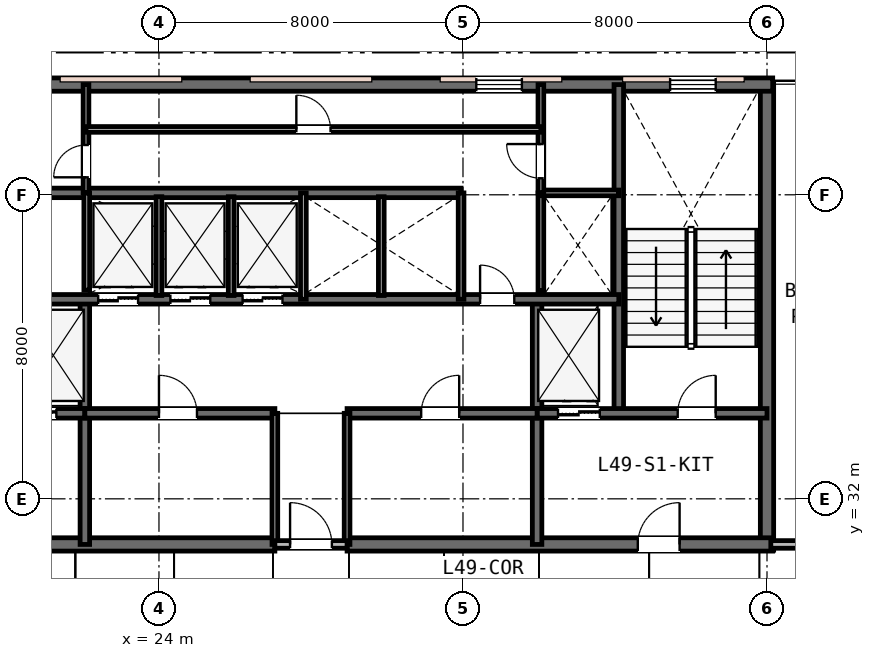
"""IFC4 building model, lengths in metres.
Left out: names, types, materials, properties, quantities, classifications, styles, units other than length and angle.
Written with IfcOpenShell. Run it as: python <this file> out.ifc"""

import sys

from ifc_helpers import new_model, si_unit, direction, frame, frame_2d, origin, place, context, subcontext, project, spatial, rectangle, extrude, element, fill, save


model = new_model("IFC4")
c1 = context("Model", 3, precision=1e-05, world=origin(), true_north=direction((0.0, 1.0)))
c2 = subcontext(c1, "Body", "Model", "MODEL_VIEW")
j1 = project(units=[si_unit("LENGTHUNIT", "METRE"), si_unit("PLANEANGLEUNIT", "RADIAN")], contexts=[c1])
p1 = place(None, origin())
s1 = spatial("IfcSite", under=j1, at=p1, CompositionType="ELEMENT")
p2 = place(p1, origin())
s2 = spatial("IfcBuilding", under=s1, at=p2, CompositionType="ELEMENT")
p3 = place(p2, frame((0.0, 0.0, 190.2)))
s3 = spatial("IfcBuildingStorey", under=s2, at=p3, CompositionType="ELEMENT", Elevation=190.2)
p4 = place(p3, frame((40.0, 30.65, 0.0), z_axis=(0.0, 0.0, 1.0), x_axis=(0.0, 1.0, 0.0)))
e1 = element("IfcWall", 1, at=p4, inside=s3, PredefinedType="SHEAR", context=c2, shape_type="SweptSolid", body=[
    extrude(rectangle(XDim=12.3, YDim=0.35, at=frame_2d((6.15, 0.0))), origin(), (0.0, 0.0, 1.0), 3.6),
])
p5 = place(p3, frame((15.85, 42.9, 0.0), z_axis=(0.0, 0.0, 1.0), x_axis=(1.0, 0.0, 0.0)))
e2 = element("IfcWall", 2, at=p5, inside=s3, PredefinedType="SHEAR", context=c2, shape_type="SweptSolid", body=[
    extrude(rectangle(XDim=24.3, YDim=0.35, at=frame_2d((12.15, 0.0))), origin(), (0.0, 0.0, 1.0), 3.6),
])
p6 = place(p5, frame((1.6, 0.0, 0.95)))
e3 = element("IfcOpeningElement", 3, at=p6, cuts=e2, PredefinedType="OPENING", context=c2, shape_type="SweptSolid", body=[
    extrude(rectangle(XDim=1.2, YDim=1.6, at=frame_2d((0.6, 0.8))), frame((0.0, 0.185, 0.0), z_axis=(0.0, -1.0, 0.0), x_axis=(1.0, 0.0, 0.0)), (0.0, 0.0, 1.0), 0.37),
])
p7 = place(p5, frame((16.5, 0.0, 0.95)))
e4 = element("IfcOpeningElement", 4, at=p7, cuts=e2, PredefinedType="OPENING", context=c2, shape_type="SweptSolid", body=[
    extrude(rectangle(XDim=1.2, YDim=1.6, at=frame_2d((0.6, 0.8))), frame((0.0, 0.185, 0.0), z_axis=(0.0, -1.0, 0.0), x_axis=(1.0, 0.0, 0.0)), (0.0, 0.0, 1.0), 0.37),
])
p8 = place(p5, frame((21.6, 0.0, 0.95)))
e5 = element("IfcOpeningElement", 5, at=p8, cuts=e2, PredefinedType="OPENING", context=c2, shape_type="SweptSolid", body=[
    extrude(rectangle(XDim=1.2, YDim=1.6, at=frame_2d((0.6, 0.8))), frame((0.0, 0.185, 0.0), z_axis=(0.0, -1.0, 0.0), x_axis=(1.0, 0.0, 0.0)), (0.0, 0.0, 1.0), 0.37),
])
p9 = place(p3, frame((15.85, 30.8, 0.0), z_axis=(0.0, 0.0, 1.0), x_axis=(1.0, 0.0, 0.0)))
e6 = element("IfcWall", 6, at=p9, inside=s3, PredefinedType="SHEAR", context=c2, shape_type="SweptSolid", body=[
    extrude(rectangle(XDim=11.2, YDim=0.35, at=frame_2d((5.6, 0.0))), origin(), (0.0, 0.0, 1.0), 3.6),
])
p10 = place(p9, frame((2.45, 0.0, 0.0)))
e7 = element("IfcOpeningElement", 7, at=p10, cuts=e6, PredefinedType="OPENING", context=c2, shape_type="SweptSolid", body=[
    extrude(rectangle(XDim=1.1, YDim=2.15, at=frame_2d((0.55, 1.075))), frame((0.0, 0.185, 0.0), z_axis=(0.0, -1.0, 0.0), x_axis=(1.0, 0.0, 0.0)), (0.0, 0.0, 1.0), 0.37),
])
p11 = place(p3, frame((28.95, 30.8, 0.0), z_axis=(0.0, 0.0, 1.0), x_axis=(1.0, 0.0, 0.0)))
e8 = element("IfcWall", 8, at=p11, inside=s3, PredefinedType="SHEAR", context=c2, shape_type="SweptSolid", body=[
    extrude(rectangle(XDim=11.2, YDim=0.35, at=frame_2d((5.6, 0.0))), origin(), (0.0, 0.0, 1.0), 3.6),
])
p12 = place(p11, frame((7.65, 0.0, 0.0)))
e9 = element("IfcOpeningElement", 9, at=p12, cuts=e8, PredefinedType="OPENING", context=c2, shape_type="SweptSolid", body=[
    extrude(rectangle(XDim=1.1, YDim=2.15, at=frame_2d((0.55, 1.075))), frame((0.0, 0.185, 0.0), z_axis=(0.0, -1.0, 0.0), x_axis=(1.0, 0.0, 0.0)), (0.0, 0.0, 1.0), 0.37),
])
p13 = place(p3, frame((36.1, 34.25, 0.0), z_axis=(0.0, 0.0, 1.0), x_axis=(0.0, 1.0, 0.0)))
e10 = element("IfcWall", 10, at=p13, inside=s3, PredefinedType="SHEAR", context=c2, shape_type="SweptSolid", body=[
    extrude(rectangle(XDim=8.65, YDim=0.25, at=frame_2d((4.325, 0.0))), origin(), (0.0, 0.0, 1.0), 3.6),
])
for number, where, z_axis, x_axis in (
    (11, (22.05, 30.8, 0.0), (0.0, 0.0, 1.0), (0.0, 1.0, 0.0)),
    (12, (33.95, 30.8, 0.0), (0.0, 0.0, 1.0), (0.0, 1.0, 0.0)),
):
    element("IfcWall", number, at=place(p3, frame(where, z_axis=z_axis, x_axis=x_axis)), inside=s3, PredefinedType="SHEAR", context=c2, shape_type="SweptSolid", body=[
        extrude(rectangle(XDim=6.45, YDim=0.25, at=frame_2d((3.225, 0.0))), origin(), (0.0, 0.0, 1.0), 3.6),
    ])
p14 = place(p3, frame((16.0, 34.25, 0.0), z_axis=(0.0, 0.0, 1.0), x_axis=(1.0, 0.0, 0.0)))
e13 = element("IfcWall", 13, at=p14, inside=s3, PredefinedType="SHEAR", context=c2, shape_type="SweptSolid", body=[
    extrude(rectangle(XDim=6.05, YDim=0.25, at=frame_2d((3.025, 0.0))), origin(), (0.0, 0.0, 1.0), 3.6),
])
p15 = place(p14, frame((1.25, 0.0, 0.0)))
e14 = element("IfcOpeningElement", 14, at=p15, cuts=e13, PredefinedType="OPENING", context=c2, shape_type="SweptSolid", body=[
    extrude(rectangle(XDim=1.0, YDim=2.15, at=frame_2d((0.5, 1.075))), frame((0.0, 0.135, 0.0), z_axis=(0.0, -1.0, 0.0), x_axis=(1.0, 0.0, 0.0)), (0.0, 0.0, 1.0), 0.27),
])
p16 = place(p14, frame((4.2, 0.0, 0.0)))
e15 = element("IfcOpeningElement", 15, at=p16, cuts=e13, PredefinedType="OPENING", context=c2, shape_type="SweptSolid", body=[
    extrude(rectangle(XDim=1.1, YDim=2.15, at=frame_2d((0.55, 1.075))), frame((0.0, 0.135, 0.0), z_axis=(0.0, -1.0, 0.0), x_axis=(1.0, 0.0, 0.0)), (0.0, 0.0, 1.0), 0.27),
])
p17 = place(p3, frame((33.95, 34.25, 0.0), z_axis=(0.0, 0.0, 1.0), x_axis=(1.0, 0.0, 0.0)))
e16 = element("IfcWall", 16, at=p17, inside=s3, PredefinedType="SHEAR", context=c2, shape_type="SweptSolid", body=[
    extrude(rectangle(XDim=6.05, YDim=0.25, at=frame_2d((3.025, 0.0))), origin(), (0.0, 0.0, 1.0), 3.6),
])
p18 = place(p17, frame((3.7, 0.0, 0.0)))
e17 = element("IfcOpeningElement", 17, at=p18, cuts=e16, PredefinedType="OPENING", context=c2, shape_type="SweptSolid", body=[
    extrude(rectangle(XDim=1.0, YDim=2.15, at=frame_2d((0.5, 1.075))), frame((0.0, 0.135, 0.0), z_axis=(0.0, -1.0, 0.0), x_axis=(1.0, 0.0, 0.0)), (0.0, 0.0, 1.0), 0.27),
])
p19 = place(p17, frame((0.55, 0.0, 0.0)))
e18 = element("IfcOpeningElement", 18, at=p19, cuts=e16, PredefinedType="OPENING", context=c2, shape_type="SweptSolid", body=[
    extrude(rectangle(XDim=1.1, YDim=2.15, at=frame_2d((0.55, 1.075))), frame((0.0, 0.135, 0.0), z_axis=(0.0, -1.0, 0.0), x_axis=(1.0, 0.0, 0.0)), (0.0, 0.0, 1.0), 0.27),
])
p20 = place(p3, frame((22.05, 34.25, 0.0), z_axis=(0.0, 0.0, 1.0), x_axis=(1.0, 0.0, 0.0)))
e19 = element("IfcWall", 19, at=p20, inside=s3, PredefinedType="SHEAR", context=c2, shape_type="SweptSolid", body=[
    extrude(rectangle(XDim=5.0, YDim=0.25, at=frame_2d((2.5, 0.0))), origin(), (0.0, 0.0, 1.0), 3.6),
])
p21 = place(p20, frame((1.95, 0.0, 0.0)))
e20 = element("IfcOpeningElement", 20, at=p21, cuts=e19, PredefinedType="OPENING", context=c2, shape_type="SweptSolid", body=[
    extrude(rectangle(XDim=1.0, YDim=2.15, at=frame_2d((0.5, 1.075))), frame((0.0, 0.135, 0.0), z_axis=(0.0, -1.0, 0.0), x_axis=(1.0, 0.0, 0.0)), (0.0, 0.0, 1.0), 0.27),
])
p22 = place(p3, frame((28.95, 34.25, 0.0), z_axis=(0.0, 0.0, 1.0), x_axis=(1.0, 0.0, 0.0)))
e21 = element("IfcWall", 21, at=p22, inside=s3, PredefinedType="SHEAR", context=c2, shape_type="SweptSolid", body=[
    extrude(rectangle(XDim=5.0, YDim=0.25, at=frame_2d((2.5, 0.0))), origin(), (0.0, 0.0, 1.0), 3.6),
])
p23 = place(p22, frame((1.95, 0.0, 0.0)))
e22 = element("IfcOpeningElement", 22, at=p23, cuts=e21, PredefinedType="OPENING", context=c2, shape_type="SweptSolid", body=[
    extrude(rectangle(XDim=1.0, YDim=2.15, at=frame_2d((0.5, 1.075))), frame((0.0, 0.135, 0.0), z_axis=(0.0, -1.0, 0.0), x_axis=(1.0, 0.0, 0.0)), (0.0, 0.0, 1.0), 0.27),
])
p24 = place(p3, frame((19.9, 37.25, 0.0), z_axis=(0.0, 0.0, 1.0), x_axis=(1.0, 0.0, 0.0)))
e23 = element("IfcWall", 23, at=p24, inside=s3, PredefinedType="SHEAR", context=c2, shape_type="SweptSolid", body=[
    extrude(rectangle(XDim=16.2, YDim=0.25, at=frame_2d((8.1, 0.0))), origin(), (0.0, 0.0, 1.0), 3.6),
])
p25 = place(p24, frame((12.55, 0.0, 0.0)))
e24 = element("IfcOpeningElement", 24, at=p25, cuts=e23, PredefinedType="OPENING", context=c2, shape_type="SweptSolid", body=[
    extrude(rectangle(XDim=0.9, YDim=2.15, at=frame_2d((0.45, 1.075))), frame((0.0, 0.135, 0.0), z_axis=(0.0, -1.0, 0.0), x_axis=(1.0, 0.0, 0.0)), (0.0, 0.0, 1.0), 0.27),
])
p26 = place(p24, frame((2.5, 0.0, 0.0)))
e25 = element("IfcOpeningElement", 25, at=p26, cuts=e23, PredefinedType="OPENING", context=c2, shape_type="SweptSolid", body=[
    extrude(rectangle(XDim=1.05, YDim=2.15, at=frame_2d((0.525, 1.075))), frame((0.0, 0.135, 0.0), z_axis=(0.0, -1.0, 0.0), x_axis=(1.0, 0.0, 0.0)), (0.0, 0.0, 1.0), 0.27),
])
p27 = place(p24, frame((4.4, 0.0, 0.0)))
e26 = element("IfcOpeningElement", 26, at=p27, cuts=e23, PredefinedType="OPENING", context=c2, shape_type="SweptSolid", body=[
    extrude(rectangle(XDim=1.05, YDim=2.15, at=frame_2d((0.525, 1.075))), frame((0.0, 0.135, 0.0), z_axis=(0.0, -1.0, 0.0), x_axis=(1.0, 0.0, 0.0)), (0.0, 0.0, 1.0), 0.27),
])
p28 = place(p24, frame((6.3, 0.0, 0.0)))
e27 = element("IfcOpeningElement", 27, at=p28, cuts=e23, PredefinedType="OPENING", context=c2, shape_type="SweptSolid", body=[
    extrude(rectangle(XDim=1.05, YDim=2.15, at=frame_2d((0.525, 1.075))), frame((0.0, 0.135, 0.0), z_axis=(0.0, -1.0, 0.0), x_axis=(1.0, 0.0, 0.0)), (0.0, 0.0, 1.0), 0.27),
])
p29 = place(p3, frame((19.9, 40.05, 0.0), z_axis=(0.0, 0.0, 1.0), x_axis=(1.0, 0.0, 0.0)))
e28 = element("IfcWall", 28, at=p29, inside=s3, PredefinedType="SHEAR", context=c2, shape_type="SweptSolid", body=[
    extrude(rectangle(XDim=12.05, YDim=0.25, at=frame_2d((6.025, 0.0))), origin(), (0.0, 0.0, 1.0), 3.6),
])
for number, where, z_axis, x_axis in (
    (29, (27.05, 30.8, 0.0), (0.0, 0.0, 1.0), (0.0, 1.0, 0.0)),
    (30, (28.95, 30.8, 0.0), (0.0, 0.0, 1.0), (0.0, 1.0, 0.0)),
):
    element("IfcWall", number, at=place(p3, frame(where, z_axis=z_axis, x_axis=x_axis)), inside=s3, PredefinedType="PLUMBINGWALL", context=c2, shape_type="SweptSolid", body=[
        extrude(rectangle(XDim=3.45, YDim=0.15, at=frame_2d((1.725, 0.0))), origin(), (0.0, 0.0, 1.0), 3.07),
    ])
p30 = place(p3, frame((27.05, 30.8, 0.0), z_axis=(0.0, 0.0, 1.0), x_axis=(1.0, 0.0, 0.0)))
e31 = element("IfcWall", 31, at=p30, inside=s3, PredefinedType="PARTITIONING", context=c2, shape_type="SweptSolid", body=[
    extrude(rectangle(XDim=1.9, YDim=0.2, at=frame_2d((0.95, 0.0))), origin(), (0.0, 0.0, 1.0), 3.07),
])
p31 = place(p30, frame((0.4, 0.0, 0.0)))
e32 = element("IfcOpeningElement", 32, at=p31, cuts=e31, PredefinedType="OPENING", context=c2, shape_type="SweptSolid", body=[
    extrude(rectangle(XDim=1.1, YDim=2.15, at=frame_2d((0.55, 1.075))), frame((0.0, 0.11, 0.0), z_axis=(0.0, -1.0, 0.0), x_axis=(1.0, 0.0, 0.0)), (0.0, 0.0, 1.0), 0.22),
])
p32 = place(p3, frame((22.1, 37.49, 0.0), z_axis=(0.0, 0.0, 1.0), x_axis=(0.0, 1.0, 0.0)))
e33 = element("IfcWall", 33, at=p32, inside=s3, PredefinedType="PLUMBINGWALL", context=c2, shape_type="SweptSolid", body=[
    extrude(rectangle(XDim=2.56, YDim=0.15, at=frame_2d((1.28, 0.0))), origin(), (0.0, 0.0, 1.0), 3.33),
])
p33 = place(p3, frame((27.8, 37.25, 0.0), z_axis=(0.0, 0.0, 1.0), x_axis=(0.0, 1.0, 0.0)))
e34 = element("IfcWall", 34, at=p33, inside=s3, PredefinedType="PLUMBINGWALL", context=c2, shape_type="SweptSolid", body=[
    extrude(rectangle(XDim=2.8, YDim=0.15, at=frame_2d((1.4, 0.0))), origin(), (0.0, 0.0, 1.0), 3.33),
])
for number, where, z_axis, x_axis in (
    (35, (24.0, 37.35, 0.0), (0.0, 0.0, 1.0), (0.0, 1.0, 0.0)),
    (36, (25.9, 37.35, 0.0), (0.0, 0.0, 1.0), (0.0, 1.0, 0.0)),
):
    element("IfcWall", number, at=place(p3, frame(where, z_axis=z_axis, x_axis=x_axis)), inside=s3, PredefinedType="PLUMBINGWALL", context=c2, shape_type="SweptSolid", body=[
        extrude(rectangle(XDim=2.6, YDim=0.15, at=frame_2d((1.3, 0.0))), origin(), (0.0, 0.0, 1.0), 3.33),
    ])
p34 = place(p3, frame((31.95, 37.25, 0.0), z_axis=(0.0, 0.0, 1.0), x_axis=(0.0, 1.0, 0.0)))
e37 = element("IfcWall", 37, at=p34, inside=s3, PredefinedType="PLUMBINGWALL", context=c2, shape_type="SweptSolid", body=[
    extrude(rectangle(XDim=2.8, YDim=0.15, at=frame_2d((1.4, 0.0))), origin(), (0.0, 0.0, 1.0), 3.33),
])
p35 = place(p3, frame((29.85, 37.35, 0.0), z_axis=(0.0, 0.0, 1.0), x_axis=(0.0, 1.0, 0.0)))
e38 = element("IfcWall", 38, at=p35, inside=s3, PredefinedType="PLUMBINGWALL", context=c2, shape_type="SweptSolid", body=[
    extrude(rectangle(XDim=2.6, YDim=0.15, at=frame_2d((1.3, 0.0))), origin(), (0.0, 0.0, 1.0), 3.33),
])
p36 = place(p3, frame((34.05, 37.473, 0.0), z_axis=(0.0, 0.0, 1.0), x_axis=(0.0, 1.0, 0.0)))
e39 = element("IfcWall", 39, at=p36, inside=s3, PredefinedType="PLUMBINGWALL", context=c2, shape_type="SweptSolid", body=[
    extrude(rectangle(XDim=2.577, YDim=0.15, at=frame_2d((1.288, 0.0))), origin(), (0.0, 0.0, 1.0), 3.33),
])
p37 = place(p3, frame((34.05, 40.05, 0.0), z_axis=(0.0, 0.0, 1.0), x_axis=(1.0, 0.0, 0.0)))
e40 = element("IfcWall", 40, at=p37, inside=s3, PredefinedType="PARTITIONING", context=c2, shape_type="SweptSolid", body=[
    extrude(rectangle(XDim=2.05, YDim=0.15, at=frame_2d((1.025, 0.0))), origin(), (0.0, 0.0, 1.0), 3.33),
])
p38 = place(p3, frame((34.05, 40.05, 0.0), z_axis=(0.0, 0.0, 1.0), x_axis=(0.0, 1.0, 0.0)))
e41 = element("IfcWall", 41, at=p38, inside=s3, PredefinedType="PARTITIONING", context=c2, shape_type="SweptSolid", body=[
    extrude(rectangle(XDim=2.85, YDim=0.15, at=frame_2d((1.425, 0.0))), origin(), (0.0, 0.0, 1.0), 3.33),
])
p39 = place(p38, frame((0.385, 0.0, 0.0)))
e42 = element("IfcOpeningElement", 42, at=p39, cuts=e41, PredefinedType="OPENING", context=c2, shape_type="SweptSolid", body=[
    extrude(rectangle(XDim=0.9, YDim=2.15, at=frame_2d((0.45, 1.075))), frame((0.0, 0.085, 0.0), z_axis=(0.0, -1.0, 0.0), x_axis=(1.0, 0.0, 0.0)), (0.0, 0.0, 1.0), 0.17),
])
p40 = place(p3, frame((22.08, 40.05, 0.0), z_axis=(0.0, 0.0, 1.0), x_axis=(0.0, 1.0, 0.0)))
e43 = element("IfcWall", 43, at=p40, inside=s3, PredefinedType="PARTITIONING", context=c2, shape_type="SweptSolid", body=[
    extrude(rectangle(XDim=2.85, YDim=0.15, at=frame_2d((1.425, 0.0))), origin(), (0.0, 0.0, 1.0), 3.33),
])
p41 = place(p40, frame((0.41, 0.0, 0.0)))
e44 = element("IfcOpeningElement", 44, at=p41, cuts=e43, PredefinedType="OPENING", context=c2, shape_type="SweptSolid", body=[
    extrude(rectangle(XDim=0.85, YDim=2.15, at=frame_2d((0.425, 1.075))), frame((0.0, 0.085, 0.0), z_axis=(0.0, -1.0, 0.0), x_axis=(1.0, 0.0, 0.0)), (0.0, 0.0, 1.0), 0.17),
])
p42 = place(p3, frame((22.08, 41.72, 0.0), z_axis=(0.0, 0.0, 1.0), x_axis=(1.0, 0.0, 0.0)))
e45 = element("IfcWall", 45, at=p42, inside=s3, PredefinedType="PARTITIONING", context=c2, shape_type="SweptSolid", body=[
    extrude(rectangle(XDim=11.97, YDim=0.15, at=frame_2d((5.985, 0.0))), origin(), (0.0, 0.0, 1.0), 3.33),
])
p43 = place(p42, frame((5.535, 0.0, 0.0)))
e46 = element("IfcOpeningElement", 46, at=p43, cuts=e45, PredefinedType="OPENING", context=c2, shape_type="SweptSolid", body=[
    extrude(rectangle(XDim=0.9, YDim=2.15, at=frame_2d((0.45, 1.075))), frame((0.0, 0.085, 0.0), z_axis=(0.0, -1.0, 0.0), x_axis=(1.0, 0.0, 0.0)), (0.0, 0.0, 1.0), 0.17),
])
p44 = place(p3, frame((40.1, 30.8, 0.0), z_axis=(0.0, 0.0, 1.0), x_axis=(1.0, 0.0, 0.0)))
e47 = element("IfcWall", 47, at=p44, inside=s3, PredefinedType="PARTITIONING", context=c2, shape_type="SweptSolid", body=[
    extrude(rectangle(XDim=4.1, YDim=0.2, at=frame_2d((2.05, 0.0))), origin(), (0.0, 0.0, 1.0), 2.92),
])
p45 = place(p44, frame((1.575, 0.0, 0.0)))
e48 = element("IfcOpeningElement", 48, at=p45, cuts=e47, PredefinedType="OPENING", context=c2, shape_type="SweptSolid", body=[
    extrude(rectangle(XDim=0.95, YDim=2.15, at=frame_2d((0.475, 1.075))), frame((0.0, 0.11, 0.0), z_axis=(0.0, -1.0, 0.0), x_axis=(1.0, 0.0, 0.0)), (0.0, 0.0, 1.0), 0.22),
])
p46 = place(p7, origin())
e49 = element("IfcWindow", 49, at=p46, inside=s3, PartitioningType="SINGLE_PANEL", PredefinedType="WINDOW", context=c2, shape_type="SweptSolid", body=[
    extrude(rectangle(XDim=1.2, YDim=1.6, at=frame_2d((0.6, 0.8))), frame((0.0, 0.03, 0.0), z_axis=(0.0, -1.0, 0.0), x_axis=(1.0, 0.0, 0.0)), (0.0, 0.0, 1.0), 0.06),
])
fill(e4, e49)
p47 = place(p8, origin())
e50 = element("IfcWindow", 50, at=p47, inside=s3, PartitioningType="SINGLE_PANEL", PredefinedType="WINDOW", context=c2, shape_type="SweptSolid", body=[
    extrude(rectangle(XDim=1.2, YDim=1.6, at=frame_2d((0.6, 0.8))), frame((0.0, 0.03, 0.0), z_axis=(0.0, -1.0, 0.0), x_axis=(1.0, 0.0, 0.0)), (0.0, 0.0, 1.0), 0.06),
])
fill(e5, e50)
p48 = place(p31, origin())
e51 = element("IfcDoor", 51, at=p48, inside=s3, OperationType="SINGLE_SWING_LEFT", PredefinedType="DOOR", context=c2, shape_type="SweptSolid", body=[
    extrude(rectangle(XDim=1.1, YDim=2.15, at=frame_2d((0.55, 1.075))), frame((0.0, 0.025, 0.0), z_axis=(0.0, -1.0, 0.0), x_axis=(1.0, 0.0, 0.0)), (0.0, 0.0, 1.0), 0.05),
])
fill(e32, e51)
p49 = place(p18, origin())
e52 = element("IfcDoor", 52, at=p49, inside=s3, OperationType="SINGLE_SWING_RIGHT", PredefinedType="DOOR", context=c2, shape_type="SweptSolid", body=[
    extrude(rectangle(XDim=1.0, YDim=2.15, at=frame_2d((0.5, 1.075))), frame((0.0, 0.025, 0.0), z_axis=(0.0, -1.0, 0.0), x_axis=(1.0, 0.0, 0.0)), (0.0, 0.0, 1.0), 0.05),
])
fill(e17, e52)
p50 = place(p12, origin())
e53 = element("IfcDoor", 53, at=p50, inside=s3, OperationType="SINGLE_SWING_RIGHT", PredefinedType="DOOR", context=c2, shape_type="SweptSolid", body=[
    extrude(rectangle(XDim=1.1, YDim=2.15, at=frame_2d((0.55, 1.075))), frame((0.0, 0.025, 0.0), z_axis=(0.0, -1.0, 0.0), x_axis=(1.0, 0.0, 0.0)), (0.0, 0.0, 1.0), 0.05),
])
fill(e9, e53)
p51 = place(p21, origin())
e54 = element("IfcDoor", 54, at=p51, inside=s3, OperationType="SINGLE_SWING_LEFT", PredefinedType="DOOR", context=c2, shape_type="SweptSolid", body=[
    extrude(rectangle(XDim=1.0, YDim=2.15, at=frame_2d((0.5, 1.075))), frame((0.0, 0.025, 0.0), z_axis=(0.0, -1.0, 0.0), x_axis=(1.0, 0.0, 0.0)), (0.0, 0.0, 1.0), 0.05),
])
fill(e20, e54)
p52 = place(p23, origin())
e55 = element("IfcDoor", 55, at=p52, inside=s3, OperationType="SINGLE_SWING_RIGHT", PredefinedType="DOOR", context=c2, shape_type="SweptSolid", body=[
    extrude(rectangle(XDim=1.0, YDim=2.15, at=frame_2d((0.5, 1.075))), frame((0.0, 0.025, 0.0), z_axis=(0.0, -1.0, 0.0), x_axis=(1.0, 0.0, 0.0)), (0.0, 0.0, 1.0), 0.05),
])
fill(e22, e55)
p53 = place(p25, origin())
e56 = element("IfcDoor", 56, at=p53, inside=s3, OperationType="SINGLE_SWING_LEFT", PredefinedType="DOOR", context=c2, shape_type="SweptSolid", body=[
    extrude(rectangle(XDim=0.9, YDim=2.15, at=frame_2d((0.45, 1.075))), frame((0.0, 0.025, 0.0), z_axis=(0.0, -1.0, 0.0), x_axis=(1.0, 0.0, 0.0)), (0.0, 0.0, 1.0), 0.05),
])
fill(e24, e56)
p54 = place(p39, origin())
e57 = element("IfcDoor", 57, at=p54, inside=s3, OperationType="SINGLE_SWING_RIGHT", PredefinedType="DOOR", context=c2, shape_type="SweptSolid", body=[
    extrude(rectangle(XDim=0.9, YDim=2.15, at=frame_2d((0.45, 1.075))), frame((0.0, 0.025, 0.0), z_axis=(0.0, -1.0, 0.0), x_axis=(1.0, 0.0, 0.0)), (0.0, 0.0, 1.0), 0.05),
])
fill(e42, e57)
p55 = place(p41, origin())
e58 = element("IfcDoor", 58, at=p55, inside=s3, OperationType="SINGLE_SWING_LEFT", PredefinedType="DOOR", context=c2, shape_type="SweptSolid", body=[
    extrude(rectangle(XDim=0.85, YDim=2.15, at=frame_2d((0.425, 1.075))), frame((0.0, 0.025, 0.0), z_axis=(0.0, -1.0, 0.0), x_axis=(1.0, 0.0, 0.0)), (0.0, 0.0, 1.0), 0.05),
])
fill(e44, e58)
p56 = place(p43, origin())
e59 = element("IfcDoor", 59, at=p56, inside=s3, OperationType="SINGLE_SWING_LEFT", PredefinedType="DOOR", context=c2, shape_type="SweptSolid", body=[
    extrude(rectangle(XDim=0.9, YDim=2.15, at=frame_2d((0.45, 1.075))), frame((0.0, 0.025, 0.0), z_axis=(0.0, -1.0, 0.0), x_axis=(1.0, 0.0, 0.0)), (0.0, 0.0, 1.0), 0.05),
])
fill(e46, e59)
p57 = place(p16, origin())
e60 = element("IfcDoor", 60, at=p57, inside=s3, OperationType="DOUBLE_DOOR_SLIDING", PredefinedType="DOOR", context=c2, shape_type="SweptSolid", body=[
    extrude(rectangle(XDim=1.1, YDim=2.15, at=frame_2d((0.55, 1.075))), frame((0.0, 0.025, 0.0), z_axis=(0.0, -1.0, 0.0), x_axis=(1.0, 0.0, 0.0)), (0.0, 0.0, 1.0), 0.05),
])
fill(e15, e60)
p58 = place(p19, origin())
e61 = element("IfcDoor", 61, at=p58, inside=s3, OperationType="DOUBLE_DOOR_SLIDING", PredefinedType="DOOR", context=c2, shape_type="SweptSolid", body=[
    extrude(rectangle(XDim=1.1, YDim=2.15, at=frame_2d((0.55, 1.075))), frame((0.0, 0.025, 0.0), z_axis=(0.0, -1.0, 0.0), x_axis=(1.0, 0.0, 0.0)), (0.0, 0.0, 1.0), 0.05),
])
fill(e18, e61)
p59 = place(p26, origin())
e62 = element("IfcDoor", 62, at=p59, inside=s3, OperationType="DOUBLE_DOOR_SLIDING", PredefinedType="DOOR", context=c2, shape_type="SweptSolid", body=[
    extrude(rectangle(XDim=1.05, YDim=2.15, at=frame_2d((0.525, 1.075))), frame((0.0, 0.025, 0.0), z_axis=(0.0, -1.0, 0.0), x_axis=(1.0, 0.0, 0.0)), (0.0, 0.0, 1.0), 0.05),
])
fill(e25, e62)
p60 = place(p27, origin())
e63 = element("IfcDoor", 63, at=p60, inside=s3, OperationType="DOUBLE_DOOR_SLIDING", PredefinedType="DOOR", context=c2, shape_type="SweptSolid", body=[
    extrude(rectangle(XDim=1.05, YDim=2.15, at=frame_2d((0.525, 1.075))), frame((0.0, 0.025, 0.0), z_axis=(0.0, -1.0, 0.0), x_axis=(1.0, 0.0, 0.0)), (0.0, 0.0, 1.0), 0.05),
])
fill(e26, e63)
p61 = place(p28, origin())
e64 = element("IfcDoor", 64, at=p61, inside=s3, OperationType="DOUBLE_DOOR_SLIDING", PredefinedType="DOOR", context=c2, shape_type="SweptSolid", body=[
    extrude(rectangle(XDim=1.05, YDim=2.15, at=frame_2d((0.525, 1.075))), frame((0.0, 0.025, 0.0), z_axis=(0.0, -1.0, 0.0), x_axis=(1.0, 0.0, 0.0)), (0.0, 0.0, 1.0), 0.05),
])
fill(e27, e64)
save(model, sys.argv[1])
